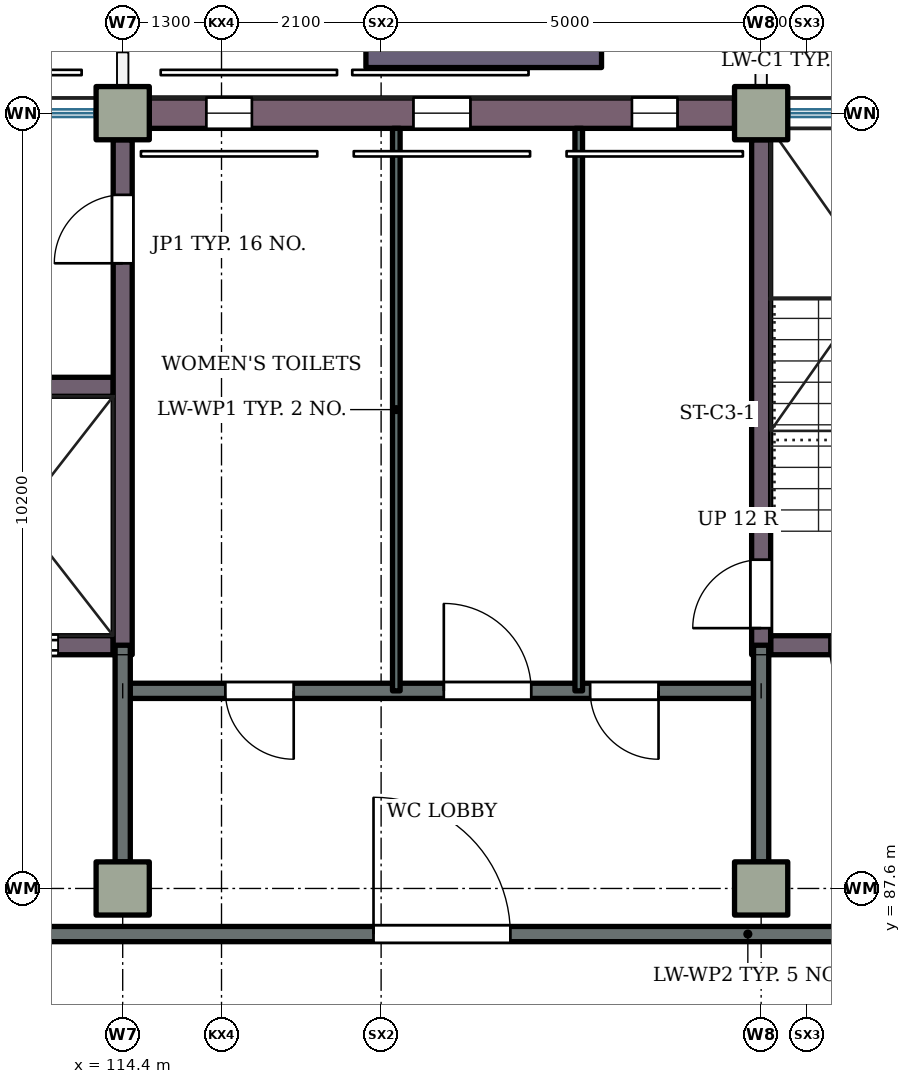
"""IFC4 building model, lengths in metres.
Left out: names, types, materials, properties, quantities, classifications, styles, units other than length and angle.
Written with IfcOpenShell. Run it as: python <this file> out.ifc"""

import sys

from ifc_helpers import new_model, si_unit, direction, frame, frame_2d, origin, origin_2d, place, context, subcontext, project, spatial, rectangle, extrude, element, fill, save


model = new_model("IFC4")
c1 = context("Model", 3, precision=1e-05, world=origin(), true_north=direction((0.0, 1.0)))
c2 = subcontext(c1, "Body", "Model", "MODEL_VIEW")
j1 = project(units=[si_unit("LENGTHUNIT", "METRE"), si_unit("PLANEANGLEUNIT", "RADIAN")], contexts=[c1])
p1 = place(None, origin())
s1 = spatial("IfcSite", under=j1, at=p1, CompositionType="ELEMENT")
p2 = place(p1, origin())
s2 = spatial("IfcBuilding", under=s1, at=p2, CompositionType="ELEMENT")
p3 = place(p2, frame((0.0, 0.0, 4.2)))
s3 = spatial("IfcBuildingStorey", under=s2, at=p3, CompositionType="ELEMENT", Elevation=4.2)
for number, where, z_axis, x_axis in (
    (1, (114.4, 87.6, 0.0), (0.0, 0.0, 1.0), (1.0, 0.0, 0.0)),
    (2, (122.8, 87.6, 0.0), (0.0, 0.0, 1.0), (1.0, 0.0, 0.0)),
    (3, (114.4, 97.8, 0.0), (0.0, 0.0, 1.0), (1.0, 0.0, 0.0)),
    (4, (122.8, 97.8, 0.0), (0.0, 0.0, 1.0), (1.0, 0.0, 0.0)),
):
    element("IfcColumn", number, at=place(p3, frame(where, z_axis=z_axis, x_axis=x_axis)), inside=s3, PredefinedType="COLUMN", context=c2, shape_type="SweptSolid", body=[
        extrude(rectangle(XDim=0.7, YDim=0.7, at=origin_2d()), origin(), (0.0, 0.0, 1.0), 4.2),
    ])
p4 = place(p3, frame((111.825, 90.8, 0.0), z_axis=(0.0, 0.0, 1.0), x_axis=(1.0, 0.0, 0.0)))
e5 = element("IfcWall", 5, at=p4, inside=s3, PredefinedType="SHEAR", context=c2, shape_type="SweptSolid", body=[
    extrude(rectangle(XDim=2.45, YDim=0.25, at=frame_2d((1.225, 0.0))), origin(), (0.0, 0.0, 1.0), 4.2),
])
p5 = place(p4, frame((0.725, 0.0, 0.0)))
e6 = element("IfcOpeningElement", 6, at=p5, cuts=e5, PredefinedType="OPENING", context=c2, shape_type="SweptSolid", body=[
    extrude(rectangle(XDim=1.0, YDim=2.1, at=frame_2d((0.5, 1.05))), frame((0.0, 0.135, 0.0), z_axis=(0.0, -1.0, 0.0), x_axis=(1.0, 0.0, 0.0)), (0.0, 0.0, 1.0), 0.27),
])
p6 = place(p3, frame((122.925, 90.8, 0.0), z_axis=(0.0, 0.0, 1.0), x_axis=(1.0, 0.0, 0.0)))
e7 = element("IfcWall", 7, at=p6, inside=s3, PredefinedType="SHEAR", context=c2, shape_type="SweptSolid", body=[
    extrude(rectangle(XDim=5.45, YDim=0.25, at=frame_2d((2.725, 0.0))), origin(), (0.0, 0.0, 1.0), 4.2),
])
p7 = place(p6, frame((0.775, 0.0, 0.0)))
e8 = element("IfcOpeningElement", 8, at=p7, cuts=e7, PredefinedType="OPENING", context=c2, shape_type="SweptSolid", body=[
    extrude(rectangle(XDim=1.2, YDim=2.1, at=frame_2d((0.6, 1.05))), frame((0.0, 0.135, 0.0), z_axis=(0.0, -1.0, 0.0), x_axis=(1.0, 0.0, 0.0)), (0.0, 0.0, 1.0), 0.27),
])
p8 = place(p3, frame((111.825, 94.2, 0.0), z_axis=(0.0, 0.0, 1.0), x_axis=(1.0, 0.0, 0.0)))
e9 = element("IfcWall", 9, at=p8, inside=s3, PredefinedType="SHEAR", context=c2, shape_type="SweptSolid", body=[
    extrude(rectangle(XDim=2.45, YDim=0.25, at=frame_2d((1.225, 0.0))), origin(), (0.0, 0.0, 1.0), 4.2),
])
p9 = place(p3, frame((114.4, 90.675, 0.0), z_axis=(0.0, 0.0, 1.0), x_axis=(0.0, 1.0, 0.0)))
e10 = element("IfcWall", 10, at=p9, inside=s3, PredefinedType="SHEAR", context=c2, shape_type="SweptSolid", body=[
    extrude(rectangle(XDim=6.775, YDim=0.25, at=frame_2d((3.387, 0.0))), origin(), (0.0, 0.0, 1.0), 4.2),
])
p10 = place(p9, frame((5.15, 0.0, 0.0)))
e11 = element("IfcOpeningElement", 11, at=p10, cuts=e10, PredefinedType="OPENING", context=c2, shape_type="SweptSolid", body=[
    extrude(rectangle(XDim=0.9, YDim=2.1, at=frame_2d((0.45, 1.05))), frame((0.0, 0.135, 0.0), z_axis=(0.0, -1.0, 0.0), x_axis=(1.0, 0.0, 0.0)), (0.0, 0.0, 1.0), 0.27),
])
p11 = place(p3, frame((122.8, 90.675, 0.0), z_axis=(0.0, 0.0, 1.0), x_axis=(0.0, 1.0, 0.0)))
e12 = element("IfcWall", 12, at=p11, inside=s3, PredefinedType="SHEAR", context=c2, shape_type="SweptSolid", body=[
    extrude(rectangle(XDim=6.775, YDim=0.25, at=frame_2d((3.387, 0.0))), origin(), (0.0, 0.0, 1.0), 4.2),
])
p12 = place(p11, frame((0.35, 0.0, 0.0)))
e13 = element("IfcOpeningElement", 13, at=p12, cuts=e12, PredefinedType="OPENING", context=c2, shape_type="SweptSolid", body=[
    extrude(rectangle(XDim=0.9, YDim=2.1, at=frame_2d((0.45, 1.05))), frame((0.0, 0.135, 0.0), z_axis=(0.0, -1.0, 0.0), x_axis=(1.0, 0.0, 0.0)), (0.0, 0.0, 1.0), 0.27),
])
p13 = place(p3, frame((114.75, 97.8, 0.0), z_axis=(0.0, 0.0, 1.0), x_axis=(1.0, 0.0, 0.0)))
e14 = element("IfcWall", 14, at=p13, inside=s3, PredefinedType="SOLIDWALL", context=c2, shape_type="SweptSolid", body=[
    extrude(rectangle(XDim=7.7, YDim=0.4, at=frame_2d((3.85, 0.0))), origin(), (0.0, 0.0, 1.0), 3.32),
])
p14 = place(p13, frame((0.75, 0.0, 2.1)))
e15 = element("IfcOpeningElement", 15, at=p14, cuts=e14, PredefinedType="OPENING", context=c2, shape_type="SweptSolid", body=[
    extrude(rectangle(XDim=0.6, YDim=0.9, at=frame_2d((0.3, 0.45))), frame((0.0, 0.21, 0.0), z_axis=(0.0, -1.0, 0.0), x_axis=(1.0, 0.0, 0.0)), (0.0, 0.0, 1.0), 0.42),
])
p15 = place(p13, frame((3.475, 0.0, 2.1)))
e16 = element("IfcOpeningElement", 16, at=p15, cuts=e14, PredefinedType="OPENING", context=c2, shape_type="SweptSolid", body=[
    extrude(rectangle(XDim=0.75, YDim=0.9, at=frame_2d((0.375, 0.45))), frame((0.0, 0.21, 0.0), z_axis=(0.0, -1.0, 0.0), x_axis=(1.0, 0.0, 0.0)), (0.0, 0.0, 1.0), 0.42),
])
p16 = place(p13, frame((6.35, 0.0, 2.1)))
e17 = element("IfcOpeningElement", 17, at=p16, cuts=e14, PredefinedType="OPENING", context=c2, shape_type="SweptSolid", body=[
    extrude(rectangle(XDim=0.6, YDim=0.9, at=frame_2d((0.3, 0.45))), frame((0.0, 0.21, 0.0), z_axis=(0.0, -1.0, 0.0), x_axis=(1.0, 0.0, 0.0)), (0.0, 0.0, 1.0), 0.42),
])
p17 = place(p3, frame((120.7, 98.9, 0.0), z_axis=(0.0, 0.0, 1.0), x_axis=(-1.0, 0.0, 0.0)))
e18 = element("IfcWall", 18, at=p17, inside=s3, PredefinedType="STANDARD", context=c2, shape_type="SweptSolid", body=[
    extrude(rectangle(XDim=3.1, YDim=1.0, at=frame_2d((1.55, 0.0))), origin(), (0.0, 0.0, 1.0), 4.2),
])
p18 = place(p3, frame((106.0, 87.0, 0.0), z_axis=(0.0, 0.0, 1.0), x_axis=(1.0, 0.0, 0.0)))
e19 = element("IfcWall", 19, at=p18, inside=s3, PredefinedType="PARTITIONING", context=c2, shape_type="SweptSolid", body=[
    extrude(rectangle(XDim=33.25, YDim=0.2, at=frame_2d((16.625, 0.0))), origin(), (0.0, 0.0, 1.0), 3.92),
])
p19 = place(p18, frame((3.3, 0.0, 0.0)))
e20 = element("IfcOpeningElement", 20, at=p19, cuts=e19, PredefinedType="OPENING", context=c2, shape_type="SweptSolid", body=[
    extrude(rectangle(XDim=1.8, YDim=2.1, at=frame_2d((0.9, 1.05))), frame((0.0, 0.11, 0.0), z_axis=(0.0, -1.0, 0.0), x_axis=(1.0, 0.0, 0.0)), (0.0, 0.0, 1.0), 0.22),
])
p20 = place(p18, frame((11.7, 0.0, 0.0)))
e21 = element("IfcOpeningElement", 21, at=p20, cuts=e19, PredefinedType="OPENING", context=c2, shape_type="SweptSolid", body=[
    extrude(rectangle(XDim=1.8, YDim=2.1, at=frame_2d((0.9, 1.05))), frame((0.0, 0.11, 0.0), z_axis=(0.0, -1.0, 0.0), x_axis=(1.0, 0.0, 0.0)), (0.0, 0.0, 1.0), 0.22),
])
p21 = place(p18, frame((20.1, 0.0, 0.0)))
e22 = element("IfcOpeningElement", 22, at=p21, cuts=e19, PredefinedType="OPENING", context=c2, shape_type="SweptSolid", body=[
    extrude(rectangle(XDim=1.8, YDim=2.1, at=frame_2d((0.9, 1.05))), frame((0.0, 0.11, 0.0), z_axis=(0.0, -1.0, 0.0), x_axis=(1.0, 0.0, 0.0)), (0.0, 0.0, 1.0), 0.22),
])
p22 = place(p18, frame((28.5, 0.0, 0.0)))
e23 = element("IfcOpeningElement", 23, at=p22, cuts=e19, PredefinedType="OPENING", context=c2, shape_type="SweptSolid", body=[
    extrude(rectangle(XDim=1.8, YDim=2.1, at=frame_2d((0.9, 1.05))), frame((0.0, 0.11, 0.0), z_axis=(0.0, -1.0, 0.0), x_axis=(1.0, 0.0, 0.0)), (0.0, 0.0, 1.0), 0.22),
])
p23 = place(p3, frame((114.4, 90.2, 0.0), z_axis=(0.0, 0.0, 1.0), x_axis=(1.0, 0.0, 0.0)))
e24 = element("IfcWall", 24, at=p23, inside=s3, PredefinedType="PARTITIONING", context=c2, shape_type="SweptSolid", body=[
    extrude(rectangle(XDim=8.4, YDim=0.2, at=frame_2d((4.2, 0.0))), origin(), (0.0, 0.0, 1.0), 3.92),
])
p24 = place(p23, frame((1.35, 0.0, 0.0)))
e25 = element("IfcOpeningElement", 25, at=p24, cuts=e24, PredefinedType="OPENING", context=c2, shape_type="SweptSolid", body=[
    extrude(rectangle(XDim=0.9, YDim=2.1, at=frame_2d((0.45, 1.05))), frame((0.0, 0.11, 0.0), z_axis=(0.0, -1.0, 0.0), x_axis=(1.0, 0.0, 0.0)), (0.0, 0.0, 1.0), 0.22),
])
p25 = place(p23, frame((4.225, 0.0, 0.0)))
e26 = element("IfcOpeningElement", 26, at=p25, cuts=e24, PredefinedType="OPENING", context=c2, shape_type="SweptSolid", body=[
    extrude(rectangle(XDim=1.15, YDim=2.1, at=frame_2d((0.575, 1.05))), frame((0.0, 0.11, 0.0), z_axis=(0.0, -1.0, 0.0), x_axis=(1.0, 0.0, 0.0)), (0.0, 0.0, 1.0), 0.22),
])
p26 = place(p23, frame((6.15, 0.0, 0.0)))
e27 = element("IfcOpeningElement", 27, at=p26, cuts=e24, PredefinedType="OPENING", context=c2, shape_type="SweptSolid", body=[
    extrude(rectangle(XDim=0.9, YDim=2.1, at=frame_2d((0.45, 1.05))), frame((0.0, 0.11, 0.0), z_axis=(0.0, -1.0, 0.0), x_axis=(1.0, 0.0, 0.0)), (0.0, 0.0, 1.0), 0.22),
])
p27 = place(p3, frame((114.4, 87.95, 0.0), z_axis=(0.0, 0.0, 1.0), x_axis=(0.0, 1.0, 0.0)))
e28 = element("IfcWall", 28, at=p27, inside=s3, PredefinedType="PARTITIONING", context=c2, shape_type="SweptSolid", body=[
    extrude(rectangle(XDim=2.85, YDim=0.2, at=frame_2d((1.425, 0.0))), origin(), (0.0, 0.0, 1.0), 3.02),
])
for number, where, z_axis, x_axis in (
    (29, (118.0, 90.2, 0.0), (0.0, 0.0, 1.0), (0.0, 1.0, 0.0)),
    (30, (120.4, 90.2, 0.0), (0.0, 0.0, 1.0), (0.0, 1.0, 0.0)),
):
    element("IfcWall", number, at=place(p3, frame(where, z_axis=z_axis, x_axis=x_axis)), inside=s3, PredefinedType="PARTITIONING", context=c2, shape_type="SweptSolid", body=[
        extrude(rectangle(XDim=7.4, YDim=0.1, at=frame_2d((3.7, 0.0))), origin(), (0.0, 0.0, 1.0), 3.92),
    ])
p28 = place(p3, frame((122.8, 87.95, 0.0), z_axis=(0.0, 0.0, 1.0), x_axis=(0.0, 1.0, 0.0)))
e31 = element("IfcWall", 31, at=p28, inside=s3, PredefinedType="PARTITIONING", context=c2, shape_type="SweptSolid", body=[
    extrude(rectangle(XDim=2.85, YDim=0.2, at=frame_2d((1.425, 0.0))), origin(), (0.0, 0.0, 1.0), 3.02),
])
p29 = place(p14, origin())
e32 = element("IfcWindow", 32, at=p29, inside=s3, PartitioningType="SINGLE_PANEL", PredefinedType="WINDOW", context=c2, shape_type="SweptSolid", body=[
    extrude(rectangle(XDim=0.6, YDim=0.9, at=frame_2d((0.3, 0.45))), frame((0.0, 0.03, 0.0), z_axis=(0.0, -1.0, 0.0), x_axis=(1.0, 0.0, 0.0)), (0.0, 0.0, 1.0), 0.06),
])
fill(e15, e32)
p30 = place(p15, origin())
e33 = element("IfcWindow", 33, at=p30, inside=s3, PartitioningType="SINGLE_PANEL", PredefinedType="WINDOW", context=c2, shape_type="SweptSolid", body=[
    extrude(rectangle(XDim=0.75, YDim=0.9, at=frame_2d((0.375, 0.45))), frame((0.0, 0.03, 0.0), z_axis=(0.0, -1.0, 0.0), x_axis=(1.0, 0.0, 0.0)), (0.0, 0.0, 1.0), 0.06),
])
fill(e16, e33)
p31 = place(p16, origin())
e34 = element("IfcWindow", 34, at=p31, inside=s3, PartitioningType="SINGLE_PANEL", PredefinedType="WINDOW", context=c2, shape_type="SweptSolid", body=[
    extrude(rectangle(XDim=0.6, YDim=0.9, at=frame_2d((0.3, 0.45))), frame((0.0, 0.03, 0.0), z_axis=(0.0, -1.0, 0.0), x_axis=(1.0, 0.0, 0.0)), (0.0, 0.0, 1.0), 0.06),
])
fill(e17, e34)
p32 = place(p10, origin())
e35 = element("IfcDoor", 35, at=p32, inside=s3, OperationType="SINGLE_SWING_LEFT", PredefinedType="DOOR", context=c2, shape_type="SweptSolid", body=[
    extrude(rectangle(XDim=0.9, YDim=2.1, at=frame_2d((0.45, 1.05))), frame((0.0, 0.025, 0.0), z_axis=(0.0, -1.0, 0.0), x_axis=(1.0, 0.0, 0.0)), (0.0, 0.0, 1.0), 0.05),
])
fill(e11, e35)
p33 = place(p24, origin())
e36 = element("IfcDoor", 36, at=p33, inside=s3, OperationType="SINGLE_SWING_RIGHT", PredefinedType="DOOR", context=c2, shape_type="SweptSolid", body=[
    extrude(rectangle(XDim=0.9, YDim=2.1, at=frame_2d((0.45, 1.05))), frame((0.0, 0.025, 0.0), z_axis=(0.0, -1.0, 0.0), x_axis=(1.0, 0.0, 0.0)), (0.0, 0.0, 1.0), 0.05),
])
fill(e25, e36)
p34 = place(p25, origin())
e37 = element("IfcDoor", 37, at=p34, inside=s3, OperationType="SINGLE_SWING_LEFT", PredefinedType="DOOR", context=c2, shape_type="SweptSolid", body=[
    extrude(rectangle(XDim=1.15, YDim=2.1, at=frame_2d((0.575, 1.05))), frame((0.0, 0.025, 0.0), z_axis=(0.0, -1.0, 0.0), x_axis=(1.0, 0.0, 0.0)), (0.0, 0.0, 1.0), 0.05),
])
fill(e26, e37)
p35 = place(p26, origin())
e38 = element("IfcDoor", 38, at=p35, inside=s3, OperationType="SINGLE_SWING_RIGHT", PredefinedType="DOOR", context=c2, shape_type="SweptSolid", body=[
    extrude(rectangle(XDim=0.9, YDim=2.1, at=frame_2d((0.45, 1.05))), frame((0.0, 0.025, 0.0), z_axis=(0.0, -1.0, 0.0), x_axis=(1.0, 0.0, 0.0)), (0.0, 0.0, 1.0), 0.05),
])
fill(e27, e38)
p36 = place(p12, origin())
e39 = element("IfcDoor", 39, at=p36, inside=s3, OperationType="SINGLE_SWING_LEFT", PredefinedType="DOOR", context=c2, shape_type="SweptSolid", body=[
    extrude(rectangle(XDim=0.9, YDim=2.1, at=frame_2d((0.45, 1.05))), frame((0.0, 0.025, 0.0), z_axis=(0.0, -1.0, 0.0), x_axis=(1.0, 0.0, 0.0)), (0.0, 0.0, 1.0), 0.05),
])
fill(e13, e39)
p37 = place(p20, origin())
e40 = element("IfcDoor", 40, at=p37, inside=s3, OperationType="DOUBLE_DOOR_SINGLE_SWING", PredefinedType="DOOR", context=c2, shape_type="SweptSolid", body=[
    extrude(rectangle(XDim=1.8, YDim=2.1, at=frame_2d((0.9, 1.05))), frame((0.0, 0.025, 0.0), z_axis=(0.0, -1.0, 0.0), x_axis=(1.0, 0.0, 0.0)), (0.0, 0.0, 1.0), 0.05),
])
fill(e21, e40)
p38 = place(p5, origin())
e41 = element("IfcDoor", 41, at=p38, inside=s3, OperationType="SLIDING_TO_LEFT", PredefinedType="DOOR", context=c2, shape_type="SweptSolid", body=[
    extrude(rectangle(XDim=1.0, YDim=2.1, at=frame_2d((0.5, 1.05))), frame((0.0, 0.025, 0.0), z_axis=(0.0, -1.0, 0.0), x_axis=(1.0, 0.0, 0.0)), (0.0, 0.0, 1.0), 0.05),
])
fill(e6, e41)
p39 = place(p7, origin())
e42 = element("IfcDoor", 42, at=p39, inside=s3, OperationType="SINGLE_SWING_RIGHT", PredefinedType="DOOR", context=c2, shape_type="SweptSolid", body=[
    extrude(rectangle(XDim=1.2, YDim=2.1, at=frame_2d((0.6, 1.05))), frame((0.0, 0.025, 0.0), z_axis=(0.0, -1.0, 0.0), x_axis=(1.0, 0.0, 0.0)), (0.0, 0.0, 1.0), 0.05),
])
fill(e8, e42)
save(model, sys.argv[1])
